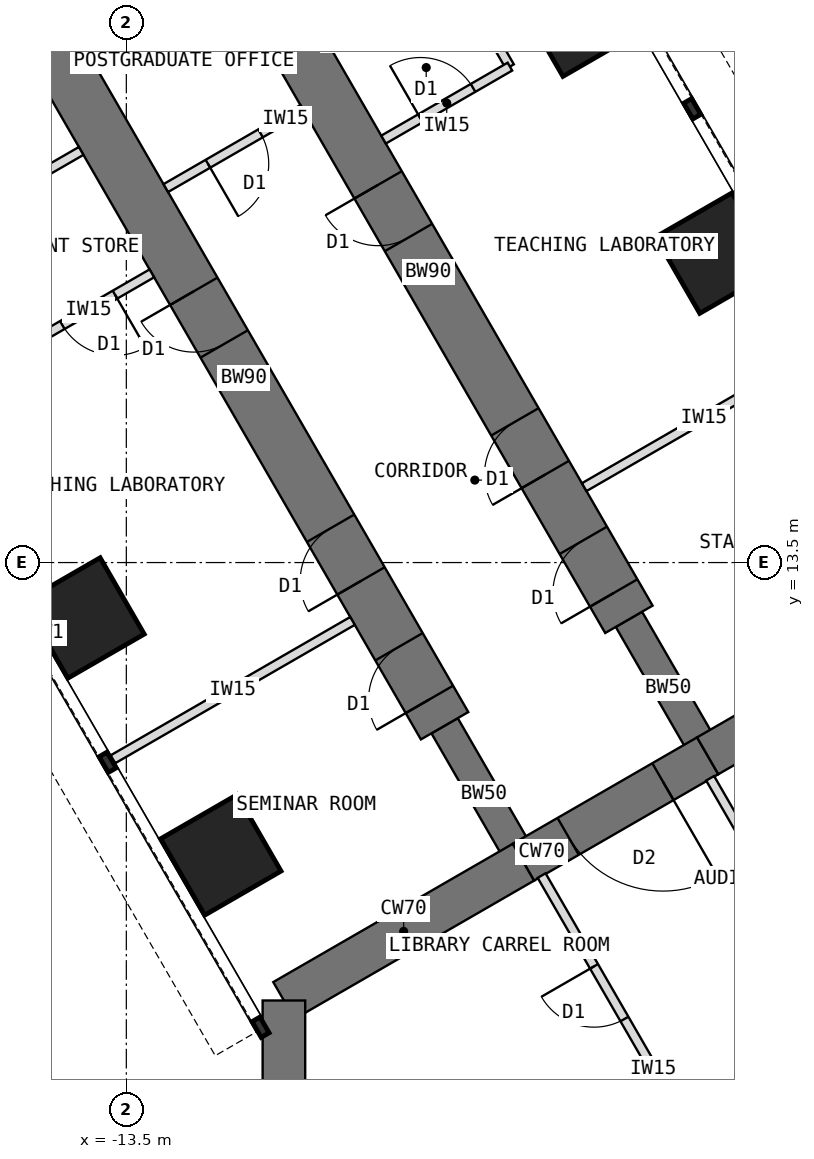
"""IFC4 building model, lengths in metres.
Left out: names, types, materials, properties, quantities, classifications, styles, units other than length and angle.
Written with IfcOpenShell. Run it as: python <this file> out.ifc"""

import sys

from ifc_helpers import new_model, si_unit, direction, frame, frame_2d, origin, origin_2d, place, context, subcontext, project, spatial, rectangle, extrude, element, fill, save


model = new_model("IFC4")
c1 = context("Model", 3, precision=1e-05, world=origin(), true_north=direction((0.0, 1.0)))
c2 = subcontext(c1, "Body", "Model", "MODEL_VIEW")
j1 = project(units=[si_unit("LENGTHUNIT", "METRE"), si_unit("PLANEANGLEUNIT", "RADIAN")], contexts=[c1])
p1 = place(None, origin())
s1 = spatial("IfcSite", under=j1, at=p1, CompositionType="ELEMENT")
p2 = place(p1, origin())
s2 = spatial("IfcBuilding", under=s1, at=p2, CompositionType="ELEMENT")
p3 = place(p2, frame((0.0, 0.0, 48.5)))
s3 = spatial("IfcBuildingStorey", under=s2, at=p3, CompositionType="ELEMENT", Elevation=48.5)
p4 = place(p3, frame((0.0, 12.596, 0.0), z_axis=(0.0, 0.0, 1.0), x_axis=(-0.866011268655, -0.500024481964, 0.0)))
e1 = element("IfcWall", 1, at=p4, inside=s3, PredefinedType="SHEAR", context=c2, shape_type="SweptSolid", body=[
    extrude(rectangle(XDim=4.548, YDim=0.7, at=frame_2d((2.274, 0.0))), origin(), (0.0, 0.0, 1.0), 4.0),
])
p5 = place(p3, frame((-3.939, 10.322, 0.0), z_axis=(0.0, 0.0, 1.0), x_axis=(-0.866019471182, -0.500010275428, 0.0)))
e2 = element("IfcWall", 2, at=p5, inside=s3, PredefinedType="SHEAR", context=c2, shape_type="SweptSolid", body=[
    extrude(rectangle(XDim=3.5, YDim=0.7, at=frame_2d((1.75, 0.0))), origin(), (0.0, 0.0, 1.0), 4.0),
])
p6 = place(p5, frame((0.85, 0.0, 0.0)))
e3 = element("IfcOpeningElement", 3, at=p6, cuts=e2, PredefinedType="OPENING", context=c2, shape_type="SweptSolid", body=[
    extrude(rectangle(XDim=1.8, YDim=2.1, at=frame_2d((0.9, 1.05))), frame((0.0, 0.36, 0.0), z_axis=(0.0, -1.0, 0.0), x_axis=(1.0, 0.0, 0.0)), (0.0, 0.0, 1.0), 0.72),
])
p7 = place(p3, frame((-6.97, 8.572, 0.0), z_axis=(0.0, 0.0, 1.0), x_axis=(-0.866034513004, -0.499984222037, 0.0)))
e4 = element("IfcWall", 4, at=p7, inside=s3, PredefinedType="SHEAR", context=c2, shape_type="SweptSolid", body=[
    extrude(rectangle(XDim=4.548, YDim=0.7, at=frame_2d((2.274, 0.0))), origin(), (0.0, 0.0, 1.0), 4.0),
])
p8 = place(p3, frame((-10.908, 6.298, 0.0), z_axis=(0.0, 0.0, 1.0), x_axis=(0.0, -1.0, 0.0)))
e5 = element("IfcWall", 5, at=p8, inside=s3, PredefinedType="SHEAR", context=c2, shape_type="SweptSolid", body=[
    extrude(rectangle(XDim=12.596, YDim=0.7, at=frame_2d((6.298, 0.0))), origin(), (0.0, 0.0, 1.0), 4.0),
])
p9 = place(p3, frame((-6.97, 8.572, 0.0), z_axis=(0.0, 0.0, 1.0), x_axis=(-0.499988811324, 0.866031863473, 0.0)))
e6 = element("IfcWall", 6, at=p9, inside=s3, PredefinedType="SHEAR", context=c2, shape_type="SweptSolid", body=[
    extrude(rectangle(XDim=2.592, YDim=0.5, at=frame_2d((1.296, 0.0))), origin(), (0.0, 0.0, 1.0), 4.0),
])
p10 = place(p3, frame((-8.266, 10.816, 0.0), z_axis=(0.0, 0.0, 1.0), x_axis=(-0.499996231654, 0.866027579429, 0.0)))
e7 = element("IfcWall", 7, at=p10, inside=s3, PredefinedType="SHEAR", context=c2, shape_type="SweptSolid", body=[
    extrude(rectangle(XDim=13.2, YDim=0.9, at=frame_2d((6.6, 0.0))), origin(), (0.0, 0.0, 1.0), 4.0),
])
p11 = place(p10, frame((0.5, 0.0, 0.0)))
e8 = element("IfcOpeningElement", 8, at=p11, cuts=e7, PredefinedType="OPENING", context=c2, shape_type="SweptSolid", body=[
    extrude(rectangle(XDim=1.0, YDim=2.1, at=frame_2d((0.5, 1.05))), frame((0.0, 0.46, 0.0), z_axis=(0.0, -1.0, 0.0), x_axis=(1.0, 0.0, 0.0)), (0.0, 0.0, 1.0), 0.92),
])
p12 = place(p10, frame((2.75, 0.0, 0.0)))
e9 = element("IfcOpeningElement", 9, at=p12, cuts=e7, PredefinedType="OPENING", context=c2, shape_type="SweptSolid", body=[
    extrude(rectangle(XDim=1.0, YDim=2.1, at=frame_2d((0.5, 1.05))), frame((0.0, 0.46, 0.0), z_axis=(0.0, -1.0, 0.0), x_axis=(1.0, 0.0, 0.0)), (0.0, 0.0, 1.0), 0.92),
])
p13 = place(p10, frame((7.25, 0.0, 0.0)))
e10 = element("IfcOpeningElement", 10, at=p13, cuts=e7, PredefinedType="OPENING", context=c2, shape_type="SweptSolid", body=[
    extrude(rectangle(XDim=1.0, YDim=2.1, at=frame_2d((0.5, 1.05))), frame((0.0, 0.46, 0.0), z_axis=(0.0, -1.0, 0.0), x_axis=(1.0, 0.0, 0.0)), (0.0, 0.0, 1.0), 0.92),
])
p14 = place(p3, frame((-3.939, 10.322, 0.0), z_axis=(0.0, 0.0, 1.0), x_axis=(-0.499918158782, 0.866072649678, 0.0)))
e11 = element("IfcWall", 11, at=p14, inside=s3, PredefinedType="SHEAR", context=c2, shape_type="SweptSolid", body=[
    extrude(rectangle(XDim=2.592, YDim=0.5, at=frame_2d((1.296, 0.0))), origin(), (0.0, 0.0, 1.0), 4.0),
])
p15 = place(p3, frame((-5.234, 12.566, 0.0), z_axis=(0.0, 0.0, 1.0), x_axis=(-0.500010103361, 0.866019570528, 0.0)))
e12 = element("IfcWall", 12, at=p15, inside=s3, PredefinedType="SHEAR", context=c2, shape_type="SweptSolid", body=[
    extrude(rectangle(XDim=13.2, YDim=0.9, at=frame_2d((6.6, 0.0))), origin(), (0.0, 0.0, 1.0), 4.0),
])
p16 = place(p15, frame((0.5, 0.0, 0.0)))
e13 = element("IfcOpeningElement", 13, at=p16, cuts=e12, PredefinedType="OPENING", context=c2, shape_type="SweptSolid", body=[
    extrude(rectangle(XDim=1.0, YDim=2.1, at=frame_2d((0.5, 1.05))), frame((0.0, 0.46, 0.0), z_axis=(0.0, -1.0, 0.0), x_axis=(1.0, 0.0, 0.0)), (0.0, 0.0, 1.0), 0.92),
])
p17 = place(p15, frame((2.75, 0.0, 0.0)))
e14 = element("IfcOpeningElement", 14, at=p17, cuts=e12, PredefinedType="OPENING", context=c2, shape_type="SweptSolid", body=[
    extrude(rectangle(XDim=1.0, YDim=2.1, at=frame_2d((0.5, 1.05))), frame((0.0, 0.46, 0.0), z_axis=(0.0, -1.0, 0.0), x_axis=(1.0, 0.0, 0.0)), (0.0, 0.0, 1.0), 0.92),
])
p18 = place(p15, frame((7.25, 0.0, 0.0)))
e15 = element("IfcOpeningElement", 15, at=p18, cuts=e12, PredefinedType="OPENING", context=c2, shape_type="SweptSolid", body=[
    extrude(rectangle(XDim=1.0, YDim=2.1, at=frame_2d((0.5, 1.05))), frame((0.0, 0.46, 0.0), z_axis=(0.0, -1.0, 0.0), x_axis=(1.0, 0.0, 0.0)), (0.0, 0.0, 1.0), 0.92),
])
for number, where, z_axis, x_axis in (
    (16, (-11.946, 8.691, 0.0), (0.0, 0.0, 1.0), (0.866, 0.5, 0.0)),
    (17, (-14.196, 12.588, 0.0), (0.0, 0.0, 1.0), (0.866, 0.5, 0.0)),
    (18, (-3.804, 18.588, 0.0), (0.0, 0.0, 1.0), (0.866, 0.5, 0.0)),
    (19, (-6.054, 22.486, 0.0), (0.0, 0.0, 1.0), (0.866, 0.5, 0.0)),
):
    element("IfcColumn", number, at=place(p3, frame(where, z_axis=z_axis, x_axis=x_axis)), inside=s3, PredefinedType="COLUMN", context=c2, shape_type="SweptSolid", body=[
        extrude(rectangle(XDim=1.45, YDim=1.45, at=origin_2d()), origin(), (0.0, 0.0, 1.0), 4.0),
    ])
p19 = place(p3, frame((-9.78, 12.54, 0.0), z_axis=(0.0, 0.0, 1.0), x_axis=(-0.866035472144, -0.499982560684, 0.0)))
e20 = element("IfcWall", 20, at=p19, inside=s3, PredefinedType="PARTITIONING", context=c2, shape_type="SweptSolid", body=[
    extrude(rectangle(XDim=4.55, YDim=0.15, at=frame_2d((2.275, 0.0))), origin(), (0.0, 0.0, 1.0), 3.8),
])
p20 = place(p3, frame((-13.08, 18.256, 0.0), z_axis=(0.0, 0.0, 1.0), x_axis=(-0.866024647952, -0.500001309137, 0.0)))
e21 = element("IfcWall", 21, at=p20, inside=s3, PredefinedType="PARTITIONING", context=c2, shape_type="SweptSolid", body=[
    extrude(rectangle(XDim=2.4, YDim=0.15, at=frame_2d((1.2, 0.0))), origin(), (0.0, 0.0, 1.0), 3.8),
])
p21 = place(p20, frame((0.7, 0.0, 0.0)))
e22 = element("IfcOpeningElement", 22, at=p21, cuts=e21, PredefinedType="OPENING", context=c2, shape_type="SweptSolid", body=[
    extrude(rectangle(XDim=1.0, YDim=2.1, at=frame_2d((0.5, 1.05))), frame((0.0, 0.085, 0.0), z_axis=(0.0, -1.0, 0.0), x_axis=(1.0, 0.0, 0.0)), (0.0, 0.0, 1.0), 0.17),
])
p22 = place(p3, frame((-14.243, 20.269, 0.0), z_axis=(0.0, 0.0, 1.0), x_axis=(-0.866006032174, -0.500033551112, 0.0)))
e23 = element("IfcWall", 23, at=p22, inside=s3, PredefinedType="PARTITIONING", context=c2, shape_type="SweptSolid", body=[
    extrude(rectangle(XDim=2.4, YDim=0.15, at=frame_2d((1.2, 0.0))), origin(), (0.0, 0.0, 1.0), 3.8),
])
p23 = place(p3, frame((-5.97, 14.74, 0.0), z_axis=(0.0, 0.0, 1.0), x_axis=(0.866035472144, 0.499982560684, 0.0)))
e24 = element("IfcWall", 24, at=p23, inside=s3, PredefinedType="PARTITIONING", context=c2, shape_type="SweptSolid", body=[
    extrude(rectangle(XDim=4.55, YDim=0.15, at=frame_2d((2.275, 0.0))), origin(), (0.0, 0.0, 1.0), 3.8),
])
p24 = place(p3, frame((-7.191, 21.656, 0.0), z_axis=(0.0, 0.0, 1.0), x_axis=(-0.500077600433, 0.865980596518, 0.0)))
e25 = element("IfcWall", 25, at=p24, inside=s3, PredefinedType="PARTITIONING", context=c2, shape_type="SweptSolid", body=[
    extrude(rectangle(XDim=2.4, YDim=0.15, at=frame_2d((1.2, 0.0))), origin(), (0.0, 0.0, 1.0), 3.8),
])
p25 = place(p3, frame((-9.27, 20.456, 0.0), z_axis=(0.0, 0.0, 1.0), x_axis=(0.866006032174, 0.500033551112, 0.0)))
e26 = element("IfcWall", 26, at=p25, inside=s3, PredefinedType="PARTITIONING", context=c2, shape_type="SweptSolid", body=[
    extrude(rectangle(XDim=2.4, YDim=0.15, at=frame_2d((1.2, 0.0))), origin(), (0.0, 0.0, 1.0), 3.8),
])
p26 = place(p25, frame((0.7, 0.0, 0.0)))
e27 = element("IfcOpeningElement", 27, at=p26, cuts=e26, PredefinedType="OPENING", context=c2, shape_type="SweptSolid", body=[
    extrude(rectangle(XDim=1.0, YDim=2.1, at=frame_2d((0.5, 1.05))), frame((0.0, 0.085, 0.0), z_axis=(0.0, -1.0, 0.0), x_axis=(1.0, 0.0, 0.0)), (0.0, 0.0, 1.0), 0.17),
])
p27 = place(p3, frame((-4.436, 4.483, 0.0), z_axis=(0.0, 0.0, 1.0), x_axis=(-0.500017246033, 0.866015446554, 0.0)))
e28 = element("IfcWall", 28, at=p27, inside=s3, PredefinedType="PARTITIONING", context=c2, shape_type="SweptSolid", body=[
    extrude(rectangle(XDim=4.469, YDim=0.15, at=frame_2d((2.234, 0.0))), origin(), (0.0, 0.0, 1.0), 3.8),
])
p28 = place(p27, frame((1.744, 0.0, 0.0)))
e29 = element("IfcOpeningElement", 29, at=p28, cuts=e28, PredefinedType="OPENING", context=c2, shape_type="SweptSolid", body=[
    extrude(rectangle(XDim=1.0, YDim=2.1, at=frame_2d((0.5, 1.05))), frame((0.0, 0.085, 0.0), z_axis=(0.0, -1.0, 0.0), x_axis=(1.0, 0.0, 0.0)), (0.0, 0.0, 1.0), 0.17),
])
p29 = place(p3, frame((-3.898, 9.952, 0.0), z_axis=(0.0, 0.0, 1.0), x_axis=(0.499999927604, -0.866025445582, 0.0)))
e30 = element("IfcWall", 30, at=p29, inside=s3, PredefinedType="PARTITIONING", context=c2, shape_type="SweptSolid", body=[
    extrude(rectangle(XDim=4.468, YDim=0.15, at=frame_2d((2.234, 0.0))), origin(), (0.0, 0.0, 1.0), 3.8),
])
p30 = place(p29, frame((1.724, 0.0, 0.0)))
e31 = element("IfcOpeningElement", 31, at=p30, cuts=e30, PredefinedType="OPENING", context=c2, shape_type="SweptSolid", body=[
    extrude(rectangle(XDim=1.0, YDim=2.1, at=frame_2d((0.5, 1.05))), frame((0.0, 0.085, 0.0), z_axis=(0.0, -1.0, 0.0), x_axis=(1.0, 0.0, 0.0)), (0.0, 0.0, 1.0), 0.17),
])
p31 = place(p3, frame((-10.599, 20.958, 0.0), z_axis=(0.0, 0.0, 1.0), x_axis=(-0.866021400173, -0.500006934395, 0.0)))
e32 = element("IfcWall", 32, at=p31, inside=s3, PredefinedType="PARTITIONING", context=c2, shape_type="SweptSolid", body=[
    extrude(rectangle(XDim=2.6, YDim=0.15, at=frame_2d((1.3, 0.0))), origin(), (0.0, 0.0, 1.0), 3.8),
])
p32 = place(p31, frame((0.8, 0.0, 0.0)))
e33 = element("IfcOpeningElement", 33, at=p32, cuts=e32, PredefinedType="OPENING", context=c2, shape_type="SweptSolid", body=[
    extrude(rectangle(XDim=1.0, YDim=2.1, at=frame_2d((0.5, 1.05))), frame((0.0, 0.085, 0.0), z_axis=(0.0, -1.0, 0.0), x_axis=(1.0, 0.0, 0.0)), (0.0, 0.0, 1.0), 0.17),
])
p33 = place(p6, origin())
e34 = element("IfcDoor", 34, at=p33, inside=s3, OperationType="DOUBLE_DOOR_DOUBLE_SWING", PredefinedType="DOOR", context=c2, shape_type="SweptSolid", body=[
    extrude(rectangle(XDim=1.72, YDim=2.06, at=frame_2d((0.9, 1.03))), frame((0.0, 0.025, 0.0), z_axis=(0.0, -1.0, 0.0), x_axis=(1.0, 0.0, 0.0)), (0.0, 0.0, 1.0), 0.05),
    extrude(rectangle(XDim=0.04, YDim=2.1, at=frame_2d((0.02, 1.05))), frame((0.0, 0.35, 0.0), z_axis=(0.0, -1.0, 0.0), x_axis=(1.0, 0.0, 0.0)), (0.0, 0.0, 1.0), 0.699),
    extrude(rectangle(XDim=0.04, YDim=2.1, at=frame_2d((1.78, 1.05))), frame((0.0, 0.35, 0.0), z_axis=(0.0, -1.0, 0.0), x_axis=(1.0, 0.0, 0.0)), (0.0, 0.0, 1.0), 0.699),
    extrude(rectangle(XDim=1.72, YDim=0.04, at=frame_2d((0.9, 2.08))), frame((0.0, 0.35, 0.0), z_axis=(0.0, -1.0, 0.0), x_axis=(1.0, 0.0, 0.0)), (0.0, 0.0, 1.0), 0.699),
])
fill(e3, e34)
p34 = place(p21, origin())
e35 = element("IfcDoor", 35, at=p34, inside=s3, OperationType="SINGLE_SWING_LEFT", PredefinedType="DOOR", context=c2, shape_type="SweptSolid", body=[
    extrude(rectangle(XDim=1.0, YDim=2.1, at=frame_2d((0.5, 1.05))), frame((0.0, 0.025, 0.0), z_axis=(0.0, -1.0, 0.0), x_axis=(1.0, 0.0, 0.0)), (0.0, 0.0, 1.0), 0.05),
])
fill(e22, e35)
p35 = place(p26, origin())
e36 = element("IfcDoor", 36, at=p35, inside=s3, OperationType="SINGLE_SWING_LEFT", PredefinedType="DOOR", context=c2, shape_type="SweptSolid", body=[
    extrude(rectangle(XDim=1.0, YDim=2.1, at=frame_2d((0.5, 1.05))), frame((0.0, 0.025, 0.0), z_axis=(0.0, -1.0, 0.0), x_axis=(1.0, 0.0, 0.0)), (0.0, 0.0, 1.0), 0.05),
])
fill(e27, e36)
p36 = place(p28, origin())
e37 = element("IfcDoor", 37, at=p36, inside=s3, OperationType="SINGLE_SWING_RIGHT", PredefinedType="DOOR", context=c2, shape_type="SweptSolid", body=[
    extrude(rectangle(XDim=1.0, YDim=2.1, at=frame_2d((0.5, 1.05))), frame((0.0, 0.025, 0.0), z_axis=(0.0, -1.0, 0.0), x_axis=(1.0, 0.0, 0.0)), (0.0, 0.0, 1.0), 0.05),
])
fill(e29, e37)
p37 = place(p32, origin())
e38 = element("IfcDoor", 38, at=p37, inside=s3, OperationType="SINGLE_SWING_RIGHT", PredefinedType="DOOR", context=c2, shape_type="SweptSolid", body=[
    extrude(rectangle(XDim=1.0, YDim=2.1, at=frame_2d((0.5, 1.05))), frame((0.0, 0.025, 0.0), z_axis=(0.0, -1.0, 0.0), x_axis=(1.0, 0.0, 0.0)), (0.0, 0.0, 1.0), 0.05),
])
fill(e33, e38)
p38 = place(p11, origin())
e39 = element("IfcDoor", 39, at=p38, inside=s3, OperationType="SINGLE_SWING_LEFT", PredefinedType="DOOR", context=c2, shape_type="SweptSolid", body=[
    extrude(rectangle(XDim=0.92, YDim=2.06, at=frame_2d((0.5, 1.03))), frame((0.0, 0.025, 0.0), z_axis=(0.0, -1.0, 0.0), x_axis=(1.0, 0.0, 0.0)), (0.0, 0.0, 1.0), 0.05),
    extrude(rectangle(XDim=0.04, YDim=2.1, at=frame_2d((0.02, 1.05))), frame((0.0, 0.45, 0.0), z_axis=(0.0, -1.0, 0.0), x_axis=(1.0, 0.0, 0.0)), (0.0, 0.0, 1.0), 0.899),
    extrude(rectangle(XDim=0.04, YDim=2.1, at=frame_2d((0.98, 1.05))), frame((0.0, 0.45, 0.0), z_axis=(0.0, -1.0, 0.0), x_axis=(1.0, 0.0, 0.0)), (0.0, 0.0, 1.0), 0.899),
    extrude(rectangle(XDim=0.92, YDim=0.04, at=frame_2d((0.5, 2.08))), frame((0.0, 0.45, 0.0), z_axis=(0.0, -1.0, 0.0), x_axis=(1.0, 0.0, 0.0)), (0.0, 0.0, 1.0), 0.899),
])
fill(e8, e39)
p39 = place(p12, origin())
e40 = element("IfcDoor", 40, at=p39, inside=s3, OperationType="SINGLE_SWING_LEFT", PredefinedType="DOOR", context=c2, shape_type="SweptSolid", body=[
    extrude(rectangle(XDim=0.92, YDim=2.06, at=frame_2d((0.5, 1.03))), frame((0.0, 0.025, 0.0), z_axis=(0.0, -1.0, 0.0), x_axis=(1.0, 0.0, 0.0)), (0.0, 0.0, 1.0), 0.05),
    extrude(rectangle(XDim=0.04, YDim=2.1, at=frame_2d((0.02, 1.05))), frame((0.0, 0.45, 0.0), z_axis=(0.0, -1.0, 0.0), x_axis=(1.0, 0.0, 0.0)), (0.0, 0.0, 1.0), 0.899),
    extrude(rectangle(XDim=0.04, YDim=2.1, at=frame_2d((0.98, 1.05))), frame((0.0, 0.45, 0.0), z_axis=(0.0, -1.0, 0.0), x_axis=(1.0, 0.0, 0.0)), (0.0, 0.0, 1.0), 0.899),
    extrude(rectangle(XDim=0.92, YDim=0.04, at=frame_2d((0.5, 2.08))), frame((0.0, 0.45, 0.0), z_axis=(0.0, -1.0, 0.0), x_axis=(1.0, 0.0, 0.0)), (0.0, 0.0, 1.0), 0.899),
])
fill(e9, e40)
p40 = place(p13, origin())
e41 = element("IfcDoor", 41, at=p40, inside=s3, OperationType="SINGLE_SWING_RIGHT", PredefinedType="DOOR", context=c2, shape_type="SweptSolid", body=[
    extrude(rectangle(XDim=0.92, YDim=2.06, at=frame_2d((0.5, 1.03))), frame((0.0, 0.025, 0.0), z_axis=(0.0, -1.0, 0.0), x_axis=(1.0, 0.0, 0.0)), (0.0, 0.0, 1.0), 0.05),
    extrude(rectangle(XDim=0.04, YDim=2.1, at=frame_2d((0.02, 1.05))), frame((0.0, 0.45, 0.0), z_axis=(0.0, -1.0, 0.0), x_axis=(1.0, 0.0, 0.0)), (0.0, 0.0, 1.0), 0.899),
    extrude(rectangle(XDim=0.04, YDim=2.1, at=frame_2d((0.98, 1.05))), frame((0.0, 0.45, 0.0), z_axis=(0.0, -1.0, 0.0), x_axis=(1.0, 0.0, 0.0)), (0.0, 0.0, 1.0), 0.899),
    extrude(rectangle(XDim=0.92, YDim=0.04, at=frame_2d((0.5, 2.08))), frame((0.0, 0.45, 0.0), z_axis=(0.0, -1.0, 0.0), x_axis=(1.0, 0.0, 0.0)), (0.0, 0.0, 1.0), 0.899),
])
fill(e10, e41)
p41 = place(p16, origin())
e42 = element("IfcDoor", 42, at=p41, inside=s3, OperationType="SINGLE_SWING_LEFT", PredefinedType="DOOR", context=c2, shape_type="SweptSolid", body=[
    extrude(rectangle(XDim=0.92, YDim=2.06, at=frame_2d((0.5, 1.03))), frame((0.0, 0.025, 0.0), z_axis=(0.0, -1.0, 0.0), x_axis=(1.0, 0.0, 0.0)), (0.0, 0.0, 1.0), 0.05),
    extrude(rectangle(XDim=0.04, YDim=2.1, at=frame_2d((0.02, 1.05))), frame((0.0, 0.45, 0.0), z_axis=(0.0, -1.0, 0.0), x_axis=(1.0, 0.0, 0.0)), (0.0, 0.0, 1.0), 0.899),
    extrude(rectangle(XDim=0.04, YDim=2.1, at=frame_2d((0.98, 1.05))), frame((0.0, 0.45, 0.0), z_axis=(0.0, -1.0, 0.0), x_axis=(1.0, 0.0, 0.0)), (0.0, 0.0, 1.0), 0.899),
    extrude(rectangle(XDim=0.92, YDim=0.04, at=frame_2d((0.5, 2.08))), frame((0.0, 0.45, 0.0), z_axis=(0.0, -1.0, 0.0), x_axis=(1.0, 0.0, 0.0)), (0.0, 0.0, 1.0), 0.899),
])
fill(e13, e42)
p42 = place(p17, origin())
e43 = element("IfcDoor", 43, at=p42, inside=s3, OperationType="SINGLE_SWING_LEFT", PredefinedType="DOOR", context=c2, shape_type="SweptSolid", body=[
    extrude(rectangle(XDim=0.92, YDim=2.06, at=frame_2d((0.5, 1.03))), frame((0.0, 0.025, 0.0), z_axis=(0.0, -1.0, 0.0), x_axis=(1.0, 0.0, 0.0)), (0.0, 0.0, 1.0), 0.05),
    extrude(rectangle(XDim=0.04, YDim=2.1, at=frame_2d((0.02, 1.05))), frame((0.0, 0.45, 0.0), z_axis=(0.0, -1.0, 0.0), x_axis=(1.0, 0.0, 0.0)), (0.0, 0.0, 1.0), 0.899),
    extrude(rectangle(XDim=0.04, YDim=2.1, at=frame_2d((0.98, 1.05))), frame((0.0, 0.45, 0.0), z_axis=(0.0, -1.0, 0.0), x_axis=(1.0, 0.0, 0.0)), (0.0, 0.0, 1.0), 0.899),
    extrude(rectangle(XDim=0.92, YDim=0.04, at=frame_2d((0.5, 2.08))), frame((0.0, 0.45, 0.0), z_axis=(0.0, -1.0, 0.0), x_axis=(1.0, 0.0, 0.0)), (0.0, 0.0, 1.0), 0.899),
])
fill(e14, e43)
p43 = place(p18, origin())
e44 = element("IfcDoor", 44, at=p43, inside=s3, OperationType="SINGLE_SWING_RIGHT", PredefinedType="DOOR", context=c2, shape_type="SweptSolid", body=[
    extrude(rectangle(XDim=0.92, YDim=2.06, at=frame_2d((0.5, 1.03))), frame((0.0, 0.025, 0.0), z_axis=(0.0, -1.0, 0.0), x_axis=(1.0, 0.0, 0.0)), (0.0, 0.0, 1.0), 0.05),
    extrude(rectangle(XDim=0.04, YDim=2.1, at=frame_2d((0.02, 1.05))), frame((0.0, 0.45, 0.0), z_axis=(0.0, -1.0, 0.0), x_axis=(1.0, 0.0, 0.0)), (0.0, 0.0, 1.0), 0.899),
    extrude(rectangle(XDim=0.04, YDim=2.1, at=frame_2d((0.98, 1.05))), frame((0.0, 0.45, 0.0), z_axis=(0.0, -1.0, 0.0), x_axis=(1.0, 0.0, 0.0)), (0.0, 0.0, 1.0), 0.899),
    extrude(rectangle(XDim=0.92, YDim=0.04, at=frame_2d((0.5, 2.08))), frame((0.0, 0.45, 0.0), z_axis=(0.0, -1.0, 0.0), x_axis=(1.0, 0.0, 0.0)), (0.0, 0.0, 1.0), 0.899),
])
fill(e15, e44)
save(model, sys.argv[1])
